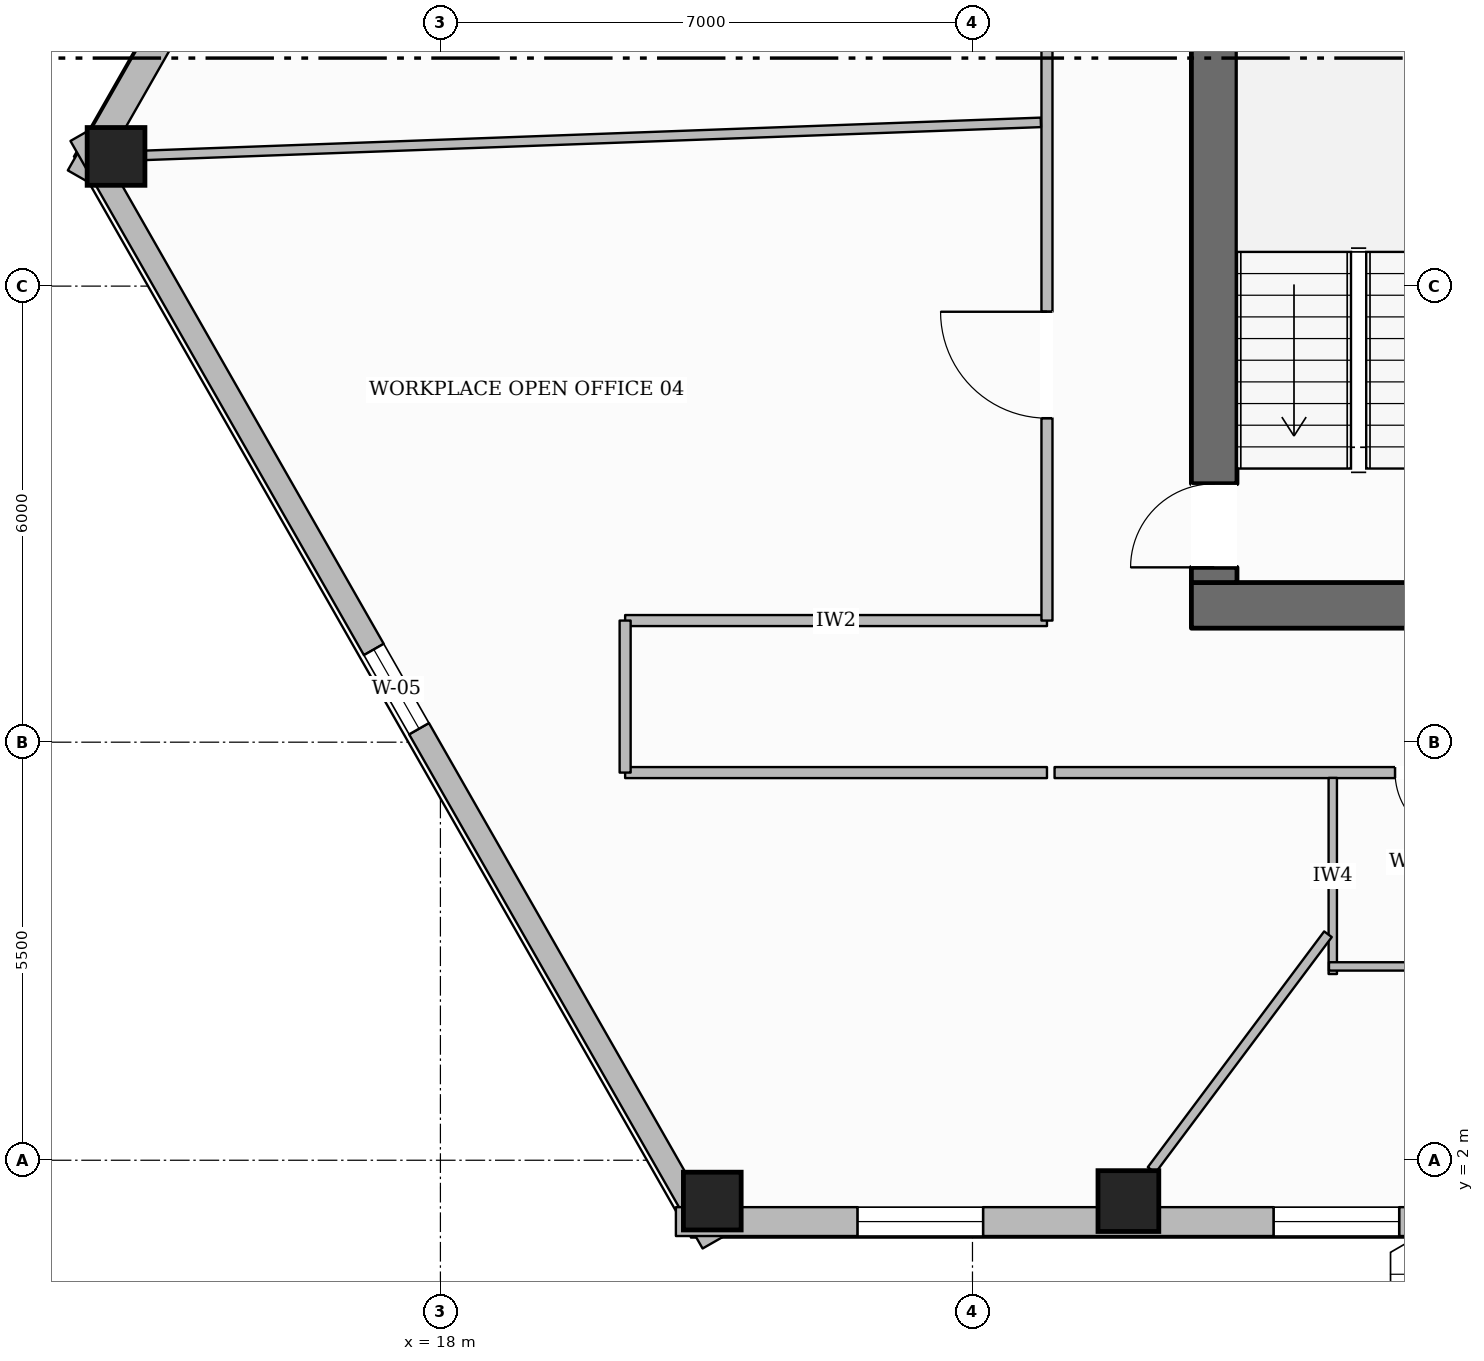
"""IFC4 building model, lengths in metres.
Left out: names, types, materials, properties, quantities, classifications, styles, units other than length and angle.
Written with IfcOpenShell. Run it as: python <this file> out.ifc"""

import sys

from ifc_helpers import new_model, si_unit, direction, frame, frame_2d, origin, origin_2d, place, context, subcontext, project, spatial, rectangle, hollow_rectangle, extrude, element, fill, save


model = new_model("IFC4")
c1 = context("Model", 3, precision=1e-05, world=origin(), true_north=direction((0.0, 1.0)))
c2 = subcontext(c1, "Body", "Model", "MODEL_VIEW")
j1 = project(units=[si_unit("LENGTHUNIT", "METRE"), si_unit("PLANEANGLEUNIT", "RADIAN")], contexts=[c1])
p1 = place(None, origin())
s1 = spatial("IfcSite", under=j1, at=p1, CompositionType="ELEMENT")
p2 = place(p1, origin())
s2 = spatial("IfcBuilding", under=s1, at=p2, CompositionType="ELEMENT")
p3 = place(p2, frame((0.0, 0.0, 21.4)))
s3 = spatial("IfcBuildingStorey", under=s2, at=p3, CompositionType="ELEMENT", Elevation=21.4)
p4 = place(p3, frame((27.88, 9.3, 0.0), z_axis=(0.0, 0.0, 1.0), x_axis=(1.0, 0.0, 0.0)))
e1 = element("IfcWall", 1, at=p4, inside=s3, PredefinedType="SOLIDWALL", context=c2, shape_type="SweptSolid", body=[
    extrude(rectangle(XDim=20.24, YDim=0.6, at=frame_2d((10.12, 0.0))), origin(), (0.0, 0.0, 1.0), 3.59),
])
p5 = place(p4, frame((10.62, 0.0, 0.0)))
e2 = element("IfcOpeningElement", 2, at=p5, cuts=e1, PredefinedType="OPENING", context=c2, shape_type="SweptSolid", body=[
    extrude(rectangle(XDim=1.4, YDim=2.2, at=frame_2d((0.7, 1.1))), frame((0.0, 0.31, 0.0), z_axis=(0.0, -1.0, 0.0), x_axis=(1.0, 0.0, 0.0)), (0.0, 0.0, 1.0), 0.62),
])
p6 = place(p3, frame((28.18, 9.6, 0.0), z_axis=(0.0, 0.0, 1.0), x_axis=(0.0, 1.0, 0.0)))
e3 = element("IfcWall", 3, at=p6, inside=s3, PredefinedType="SOLIDWALL", context=c2, shape_type="SweptSolid", body=[
    extrude(rectangle(XDim=13.0, YDim=0.6, at=frame_2d((6.5, 0.0))), origin(), (0.0, 0.0, 1.0), 3.59),
])
p7 = place(p6, frame((0.2, 0.0, 0.0)))
e4 = element("IfcOpeningElement", 4, at=p7, cuts=e3, PredefinedType="OPENING", context=c2, shape_type="SweptSolid", body=[
    extrude(rectangle(XDim=1.1, YDim=2.15, at=frame_2d((0.55, 1.075))), frame((0.0, 0.31, 0.0), z_axis=(0.0, -1.0, 0.0), x_axis=(1.0, 0.0, 0.0)), (0.0, 0.0, 1.0), 0.62),
])
p8 = place(p6, frame((8.4, 0.0, 0.0)))
e5 = element("IfcOpeningElement", 5, at=p8, cuts=e3, PredefinedType="OPENING", context=c2, shape_type="SweptSolid", body=[
    extrude(rectangle(XDim=0.9, YDim=2.1, at=frame_2d((0.45, 1.05))), frame((0.0, 0.31, 0.0), z_axis=(0.0, -1.0, 0.0), x_axis=(1.0, 0.0, 0.0)), (0.0, 0.0, 1.0), 0.62),
])
for number, where, z_axis, x_axis in (
    (6, (13.733, 15.206, 0.0), (0.0, 0.0, 1.0), (1.0, 0.0, 0.0)),
    (7, (21.577, 1.463, 0.0), (0.0, 0.0, 1.0), (1.0, 0.0, 0.0)),
):
    element("IfcColumn", number, at=place(p3, frame(where, z_axis=z_axis, x_axis=x_axis)), inside=s3, PredefinedType="COLUMN", context=c2, shape_type="SweptSolid", body=[
        extrude(hollow_rectangle(XDim=0.76, YDim=0.76, WallThickness=0.035, at=origin_2d()), origin(), (0.0, 0.0, 1.0), 3.59),
    ])
p9 = place(p3, frame((27.051, 1.463, 0.0), z_axis=(0.0, 0.0, 1.0), x_axis=(1.0, 0.0, 0.0)))
e8 = element("IfcColumn", 8, at=p9, inside=s3, PredefinedType="COLUMN", context=c2, shape_type="SweptSolid", body=[
    extrude(hollow_rectangle(XDim=0.8, YDim=0.8, WallThickness=0.036, at=origin_2d()), origin(), (0.0, 0.0, 1.0), 3.59),
])
p10 = place(p3, frame((13.263, 14.928, 0.0), z_axis=(0.0, 0.0, 1.0), x_axis=(0.495711630902, 0.868487178367, 0.0)))
e9 = element("IfcWall", 9, at=p10, inside=s3, PredefinedType="STANDARD", context=c2, shape_type="SweptSolid", body=[
    extrude(rectangle(XDim=34.092, YDim=0.38, at=frame_2d((17.046, 0.0))), origin(), (0.0, 0.0, 1.0), 2.97),
])
p11 = place(p10, frame((30.027, 0.0, 0.65)))
e10 = element("IfcOpeningElement", 10, at=p11, cuts=e9, PredefinedType="OPENING", context=c2, shape_type="SweptSolid", body=[
    extrude(rectangle(XDim=1.65, YDim=1.75, at=frame_2d((0.825, 0.875))), frame((0.0, 0.2, 0.0), z_axis=(0.0, -1.0, 0.0), x_axis=(1.0, 0.0, 0.0)), (0.0, 0.0, 1.0), 0.4),
])
p12 = place(p10, frame((24.504, 0.0, 0.65)))
e11 = element("IfcOpeningElement", 11, at=p12, cuts=e9, PredefinedType="OPENING", context=c2, shape_type="SweptSolid", body=[
    extrude(rectangle(XDim=1.65, YDim=1.75, at=frame_2d((0.825, 0.875))), frame((0.0, 0.2, 0.0), z_axis=(0.0, -1.0, 0.0), x_axis=(1.0, 0.0, 0.0)), (0.0, 0.0, 1.0), 0.4),
])
p13 = place(p10, frame((13.457, 0.0, 0.65)))
e12 = element("IfcOpeningElement", 12, at=p13, cuts=e9, PredefinedType="OPENING", context=c2, shape_type="SweptSolid", body=[
    extrude(rectangle(XDim=1.65, YDim=1.75, at=frame_2d((0.825, 0.875))), frame((0.0, 0.2, 0.0), z_axis=(0.0, -1.0, 0.0), x_axis=(1.0, 0.0, 0.0)), (0.0, 0.0, 1.0), 0.4),
])
p14 = place(p10, frame((7.934, 0.0, 0.65)))
e13 = element("IfcOpeningElement", 13, at=p14, cuts=e9, PredefinedType="OPENING", context=c2, shape_type="SweptSolid", body=[
    extrude(rectangle(XDim=1.65, YDim=1.75, at=frame_2d((0.825, 0.875))), frame((0.0, 0.2, 0.0), z_axis=(0.0, -1.0, 0.0), x_axis=(1.0, 0.0, 0.0)), (0.0, 0.0, 1.0), 0.4),
])
p15 = place(p10, frame((2.411, 0.0, 0.65)))
e14 = element("IfcOpeningElement", 14, at=p15, cuts=e9, PredefinedType="OPENING", context=c2, shape_type="SweptSolid", body=[
    extrude(rectangle(XDim=1.65, YDim=1.75, at=frame_2d((0.825, 0.875))), frame((0.0, 0.2, 0.0), z_axis=(0.0, -1.0, 0.0), x_axis=(1.0, 0.0, 0.0)), (0.0, 0.0, 1.0), 0.4),
])
p16 = place(p3, frame((21.58, 0.913, 0.0), z_axis=(0.0, 0.0, 1.0), x_axis=(-0.495706340457, 0.868490198005, 0.0)))
e15 = element("IfcWall", 15, at=p16, inside=s3, PredefinedType="STANDARD", context=c2, shape_type="SweptSolid", body=[
    extrude(rectangle(XDim=16.777, YDim=0.3, at=frame_2d((8.388, 0.0))), origin(), (0.0, 0.0, 1.0), 2.97),
])
p17 = place(p16, frame((7.789, 0.0, 0.65)))
e16 = element("IfcOpeningElement", 16, at=p17, cuts=e15, PredefinedType="OPENING", context=c2, shape_type="SweptSolid", body=[
    extrude(rectangle(XDim=1.2, YDim=1.7, at=frame_2d((0.6, 0.85))), frame((0.0, 0.16, 0.0), z_axis=(0.0, -1.0, 0.0), x_axis=(1.0, 0.0, 0.0)), (0.0, 0.0, 1.0), 0.32),
])
p18 = place(p3, frame((54.902, 1.193, 0.0), z_axis=(0.0, 0.0, 1.0), x_axis=(-1.0, 0.0, 0.0)))
e17 = element("IfcWall", 17, at=p18, inside=s3, PredefinedType="STANDARD", context=c2, shape_type="SweptSolid", body=[
    extrude(rectangle(XDim=33.804, YDim=0.38, at=frame_2d((16.902, 0.0))), origin(), (0.0, 0.0, 1.0), 2.97),
])
p19 = place(p18, frame((29.763, 0.0, 0.65)))
e18 = element("IfcOpeningElement", 18, at=p19, cuts=e17, PredefinedType="OPENING", context=c2, shape_type="SweptSolid", body=[
    extrude(rectangle(XDim=1.65, YDim=1.75, at=frame_2d((0.825, 0.875))), frame((0.0, 0.2, 0.0), z_axis=(0.0, -1.0, 0.0), x_axis=(1.0, 0.0, 0.0)), (0.0, 0.0, 1.0), 0.4),
])
p20 = place(p18, frame((24.288, 0.0, 0.65)))
e19 = element("IfcOpeningElement", 19, at=p20, cuts=e17, PredefinedType="OPENING", context=c2, shape_type="SweptSolid", body=[
    extrude(rectangle(XDim=1.65, YDim=1.75, at=frame_2d((0.825, 0.875))), frame((0.0, 0.2, 0.0), z_axis=(0.0, -1.0, 0.0), x_axis=(1.0, 0.0, 0.0)), (0.0, 0.0, 1.0), 0.4),
])
p21 = place(p18, frame((13.34, 0.0, 0.65)))
e20 = element("IfcOpeningElement", 20, at=p21, cuts=e17, PredefinedType="OPENING", context=c2, shape_type="SweptSolid", body=[
    extrude(rectangle(XDim=1.65, YDim=1.75, at=frame_2d((0.825, 0.875))), frame((0.0, 0.2, 0.0), z_axis=(0.0, -1.0, 0.0), x_axis=(1.0, 0.0, 0.0)), (0.0, 0.0, 1.0), 0.4),
])
p22 = place(p18, frame((7.865, 0.0, 0.65)))
e21 = element("IfcOpeningElement", 21, at=p22, cuts=e17, PredefinedType="OPENING", context=c2, shape_type="SweptSolid", body=[
    extrude(rectangle(XDim=1.65, YDim=1.75, at=frame_2d((0.825, 0.875))), frame((0.0, 0.2, 0.0), z_axis=(0.0, -1.0, 0.0), x_axis=(1.0, 0.0, 0.0)), (0.0, 0.0, 1.0), 0.4),
])
p23 = place(p18, frame((2.391, 0.0, 0.65)))
e22 = element("IfcOpeningElement", 22, at=p23, cuts=e17, PredefinedType="OPENING", context=c2, shape_type="SweptSolid", body=[
    extrude(rectangle(XDim=1.65, YDim=1.75, at=frame_2d((0.825, 0.875))), frame((0.0, 0.2, 0.0), z_axis=(0.0, -1.0, 0.0), x_axis=(1.0, 0.0, 0.0)), (0.0, 0.0, 1.0), 0.4),
])
p24 = place(p3, frame((20.43, 9.1, 0.0), z_axis=(0.0, 0.0, 1.0), x_axis=(1.0, 0.0, 0.0)))
e23 = element("IfcWall", 23, at=p24, inside=s3, PredefinedType="PARTITIONING", context=c2, shape_type="SweptSolid", body=[
    extrude(rectangle(XDim=5.55, YDim=0.145, at=frame_2d((2.775, 0.0))), origin(), (0.0, 0.0, 1.0), 3.59),
])
p25 = place(p3, frame((25.98, 9.1, 0.0), z_axis=(0.0, 0.0, 1.0), x_axis=(0.0, 1.0, 0.0)))
e24 = element("IfcWall", 24, at=p25, inside=s3, PredefinedType="PARTITIONING", context=c2, shape_type="SweptSolid", body=[
    extrude(rectangle(XDim=16.0, YDim=0.145, at=frame_2d((8.0, 0.0))), origin(), (0.0, 0.0, 1.0), 3.278),
])
p26 = place(p25, frame((10.491, 0.0, 0.0)))
e25 = element("IfcOpeningElement", 25, at=p26, cuts=e24, PredefinedType="OPENING", context=c2, shape_type="SweptSolid", body=[
    extrude(rectangle(XDim=1.4, YDim=2.2, at=frame_2d((0.7, 1.1))), frame((0.0, 0.083, 0.0), z_axis=(0.0, -1.0, 0.0), x_axis=(1.0, 0.0, 0.0)), (0.0, 0.0, 1.0), 0.165),
])
p27 = place(p25, frame((2.663, 0.0, 0.0)))
e26 = element("IfcOpeningElement", 26, at=p27, cuts=e24, PredefinedType="OPENING", context=c2, shape_type="SweptSolid", body=[
    extrude(rectangle(XDim=1.4, YDim=2.2, at=frame_2d((0.7, 1.1))), frame((0.0, 0.083, 0.0), z_axis=(0.0, -1.0, 0.0), x_axis=(1.0, 0.0, 0.0)), (0.0, 0.0, 1.0), 0.165),
])
p28 = place(p3, frame((49.92, 7.1, 0.0), z_axis=(0.0, 0.0, 1.0), x_axis=(-1.0, 0.0, 0.0)))
e27 = element("IfcWall", 27, at=p28, inside=s3, PredefinedType="PARTITIONING", context=c2, shape_type="SweptSolid", body=[
    extrude(rectangle(XDim=23.84, YDim=0.145, at=frame_2d((11.92, 0.0))), origin(), (0.0, 0.0, 1.0), 3.278),
])
p29 = place(p28, frame((18.48, 0.0, 0.0)))
e28 = element("IfcOpeningElement", 28, at=p29, cuts=e27, PredefinedType="OPENING", context=c2, shape_type="SweptSolid", body=[
    extrude(rectangle(XDim=0.88, YDim=2.1, at=frame_2d((0.44, 1.05))), frame((0.0, 0.083, 0.0), z_axis=(0.0, -1.0, 0.0), x_axis=(1.0, 0.0, 0.0)), (0.0, 0.0, 1.0), 0.165),
])
p30 = place(p28, frame((15.96, 0.0, 0.0)))
e29 = element("IfcOpeningElement", 29, at=p30, cuts=e27, PredefinedType="OPENING", context=c2, shape_type="SweptSolid", body=[
    extrude(rectangle(XDim=0.88, YDim=2.1, at=frame_2d((0.44, 1.05))), frame((0.0, 0.083, 0.0), z_axis=(0.0, -1.0, 0.0), x_axis=(1.0, 0.0, 0.0)), (0.0, 0.0, 1.0), 0.165),
])
p31 = place(p28, frame((13.5, 0.0, 0.0)))
e30 = element("IfcOpeningElement", 30, at=p31, cuts=e27, PredefinedType="OPENING", context=c2, shape_type="SweptSolid", body=[
    extrude(rectangle(XDim=0.96, YDim=2.1, at=frame_2d((0.48, 1.05))), frame((0.0, 0.083, 0.0), z_axis=(0.0, -1.0, 0.0), x_axis=(1.0, 0.0, 0.0)), (0.0, 0.0, 1.0), 0.165),
])
p32 = place(p28, frame((8.311, 0.0, 0.0)))
e31 = element("IfcOpeningElement", 31, at=p32, cuts=e27, PredefinedType="OPENING", context=c2, shape_type="SweptSolid", body=[
    extrude(rectangle(XDim=1.4, YDim=2.2, at=frame_2d((0.7, 1.1))), frame((0.0, 0.083, 0.0), z_axis=(0.0, -1.0, 0.0), x_axis=(1.0, 0.0, 0.0)), (0.0, 0.0, 1.0), 0.165),
])
p33 = place(p3, frame((25.98, 7.1, 0.0), z_axis=(0.0, 0.0, 1.0), x_axis=(-1.0, 0.0, 0.0)))
e32 = element("IfcWall", 32, at=p33, inside=s3, PredefinedType="PARTITIONING", context=c2, shape_type="SweptSolid", body=[
    extrude(rectangle(XDim=5.55, YDim=0.145, at=frame_2d((2.775, 0.0))), origin(), (0.0, 0.0, 1.0), 3.59),
])
p34 = place(p3, frame((20.43, 7.1, 0.0), z_axis=(0.0, 0.0, 1.0), x_axis=(0.0, 1.0, 0.0)))
e33 = element("IfcWall", 33, at=p34, inside=s3, PredefinedType="PARTITIONING", context=c2, shape_type="SweptSolid", body=[
    extrude(rectangle(XDim=2.0, YDim=0.145, at=frame_2d((1.0, 0.0))), origin(), (0.0, 0.0, 1.0), 3.59),
])
p35 = place(p3, frame((29.74, 4.45, 0.0), z_axis=(0.0, 0.0, 1.0), x_axis=(0.0, 1.0, 0.0)))
e34 = element("IfcWall", 34, at=p35, inside=s3, PredefinedType="PLUMBINGWALL", context=c2, shape_type="SweptSolid", body=[
    extrude(rectangle(XDim=2.58, YDim=0.11, at=frame_2d((1.29, 0.0))), origin(), (0.0, 0.0, 1.0), 3.59),
])
p36 = place(p3, frame((29.69, 4.55, 0.0), z_axis=(0.0, 0.0, 1.0), x_axis=(1.0, 0.0, 0.0)))
e35 = element("IfcWall", 35, at=p36, inside=s3, PredefinedType="PLUMBINGWALL", context=c2, shape_type="SweptSolid", body=[
    extrude(rectangle(XDim=7.46, YDim=0.11, at=frame_2d((3.73, 0.0))), origin(), (0.0, 0.0, 1.0), 3.59),
])
p37 = place(p3, frame((25.899, 15.654, 0.0), z_axis=(0.0, 0.0, 1.0), x_axis=(-0.999322388706, -0.036807111154, 0.0)))
e36 = element("IfcWall", 36, at=p37, inside=s3, PredefinedType="PARTITIONING", context=c2, shape_type="SweptSolid", body=[
    extrude(rectangle(XDim=11.787, YDim=0.125, at=frame_2d((5.894, 0.0))), origin(), (0.0, 0.0, 1.0), 3.057),
])
p38 = place(p3, frame((29.677, 4.973, 0.0), z_axis=(0.0, 0.0, 1.0), x_axis=(-0.598981151393, -0.800763123699, 0.0)))
e37 = element("IfcWall", 37, at=p38, inside=s3, PredefinedType="PARTITIONING", context=c2, shape_type="SweptSolid", body=[
    extrude(rectangle(XDim=3.874, YDim=0.125, at=frame_2d((1.937, 0.0))), origin(), (0.0, 0.0, 1.0), 3.59),
])
p39 = place(p19, origin())
e38 = element("IfcWindow", 38, at=p39, inside=s3, PartitioningType="SINGLE_PANEL", PredefinedType="WINDOW", context=c2, shape_type="SweptSolid", body=[
    extrude(rectangle(XDim=1.65, YDim=1.75, at=frame_2d((0.825, 0.875))), frame((0.0, 0.03, 0.0), z_axis=(0.0, -1.0, 0.0), x_axis=(1.0, 0.0, 0.0)), (0.0, 0.0, 1.0), 0.06),
])
fill(e18, e38)
p40 = place(p20, origin())
e39 = element("IfcWindow", 39, at=p40, inside=s3, PartitioningType="SINGLE_PANEL", PredefinedType="WINDOW", context=c2, shape_type="SweptSolid", body=[
    extrude(rectangle(XDim=1.65, YDim=1.75, at=frame_2d((0.825, 0.875))), frame((0.0, 0.03, 0.0), z_axis=(0.0, -1.0, 0.0), x_axis=(1.0, 0.0, 0.0)), (0.0, 0.0, 1.0), 0.06),
])
fill(e19, e39)
p41 = place(p17, origin())
e40 = element("IfcWindow", 40, at=p41, inside=s3, PartitioningType="SINGLE_PANEL", PredefinedType="WINDOW", context=c2, shape_type="SweptSolid", body=[
    extrude(rectangle(XDim=1.2, YDim=1.7, at=frame_2d((0.6, 0.85))), frame((0.0, 0.03, 0.0), z_axis=(0.0, -1.0, 0.0), x_axis=(1.0, 0.0, 0.0)), (0.0, 0.0, 1.0), 0.06),
])
fill(e16, e40)
p42 = place(p7, origin())
e41 = element("IfcDoor", 41, at=p42, inside=s3, OperationType="SINGLE_SWING_LEFT", PredefinedType="DOOR", context=c2, shape_type="SweptSolid", body=[
    extrude(rectangle(XDim=1.1, YDim=2.15, at=frame_2d((0.55, 1.075))), frame((0.0, 0.025, 0.0), z_axis=(0.0, -1.0, 0.0), x_axis=(1.0, 0.0, 0.0)), (0.0, 0.0, 1.0), 0.05),
])
fill(e4, e41)
p43 = place(p29, origin())
e42 = element("IfcDoor", 42, at=p43, inside=s3, OperationType="SINGLE_SWING_LEFT", PredefinedType="DOOR", context=c2, shape_type="SweptSolid", body=[
    extrude(rectangle(XDim=0.88, YDim=2.1, at=frame_2d((0.44, 1.05))), frame((0.0, 0.025, 0.0), z_axis=(0.0, -1.0, 0.0), x_axis=(1.0, 0.0, 0.0)), (0.0, 0.0, 1.0), 0.05),
])
fill(e28, e42)
p44 = place(p27, origin())
e43 = element("IfcDoor", 43, at=p44, inside=s3, OperationType="SINGLE_SWING_RIGHT", PredefinedType="DOOR", context=c2, shape_type="SweptSolid", body=[
    extrude(rectangle(XDim=1.4, YDim=2.2, at=frame_2d((0.7, 1.1))), frame((0.0, 0.025, 0.0), z_axis=(0.0, -1.0, 0.0), x_axis=(1.0, 0.0, 0.0)), (0.0, 0.0, 1.0), 0.05),
])
fill(e26, e43)
save(model, sys.argv[1])
